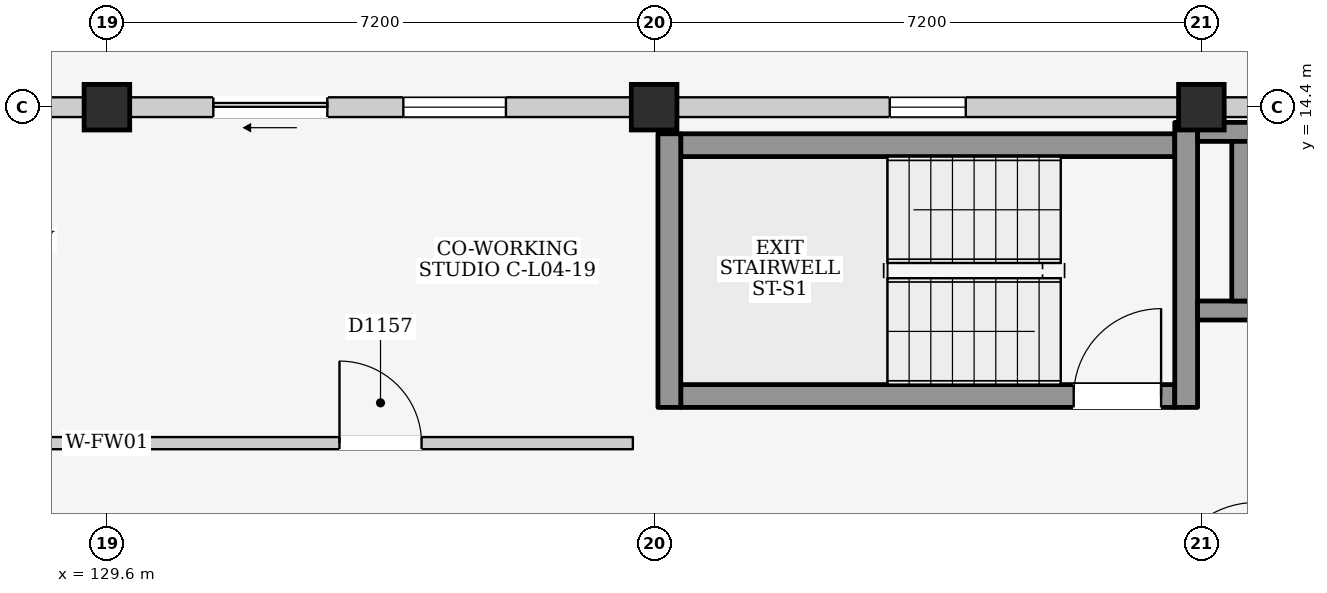
"""IFC4 building model, lengths in metres.
Left out: names, types, materials, properties, quantities, classifications, styles, units other than length and angle.
Written with IfcOpenShell. Run it as: python <this file> out.ifc"""

import sys

from ifc_helpers import new_model, si_unit, direction, frame, frame_2d, origin, origin_2d, place, context, subcontext, project, spatial, rectangle, extrude, element, fill, save


model = new_model("IFC4")
c1 = context("Model", 3, precision=1e-05, world=origin(), true_north=direction((0.0, 1.0)))
c2 = subcontext(c1, "Body", "Model", "MODEL_VIEW")
j1 = project(units=[si_unit("LENGTHUNIT", "METRE"), si_unit("PLANEANGLEUNIT", "RADIAN")], contexts=[c1])
p1 = place(None, origin())
s1 = spatial("IfcSite", under=j1, at=p1, CompositionType="ELEMENT")
p2 = place(p1, origin())
s2 = spatial("IfcBuilding", under=s1, at=p2, CompositionType="ELEMENT")
p3 = place(p2, frame((0.0, 0.0, 15.4)))
s3 = spatial("IfcBuildingStorey", under=s2, at=p3, CompositionType="ELEMENT", Elevation=15.4)
for number, where, z_axis, x_axis in (
    (1, (129.6, 14.4, 0.0), (0.0, 0.0, 1.0), (1.0, 0.0, 0.0)),
    (2, (136.8, 14.4, 0.0), (0.0, 0.0, 1.0), (1.0, 0.0, 0.0)),
    (3, (144.0, 14.4, 0.0), (0.0, 0.0, 1.0), (1.0, 0.0, 0.0)),
):
    element("IfcColumn", number, at=place(p3, frame(where, z_axis=z_axis, x_axis=x_axis)), inside=s3, PredefinedType="COLUMN", context=c2, shape_type="SweptSolid", body=[
        extrude(rectangle(XDim=0.6, YDim=0.6, at=origin_2d()), origin(), (0.0, 0.0, 1.0), 3.2),
    ])
p4 = place(p3, frame((122.7, 14.4, 0.0), z_axis=(0.0, 0.0, 1.0), x_axis=(1.0, 0.0, 0.0)))
e4 = element("IfcWall", 4, at=p4, inside=s3, PredefinedType="ELEMENTEDWALL", context=c2, shape_type="SweptSolid", body=[
    extrude(rectangle(XDim=6.6, YDim=0.26, at=frame_2d((3.3, 0.0))), origin(), (0.0, 0.0, 1.0), 2.335),
])
p5 = place(p4, frame((1.1, 0.0, 0.0)))
e5 = element("IfcOpeningElement", 5, at=p5, cuts=e4, PredefinedType="OPENING", context=c2, shape_type="SweptSolid", body=[
    extrude(rectangle(XDim=1.5, YDim=2.12, at=frame_2d((0.75, 1.06))), frame((0.0, 0.145, 0.0), z_axis=(0.0, -1.0, 0.0), x_axis=(1.0, 0.0, 0.0)), (0.0, 0.0, 1.0), 0.29),
])
p6 = place(p4, frame((3.6, 0.0, 0.725)))
e6 = element("IfcOpeningElement", 6, at=p6, cuts=e4, PredefinedType="OPENING", context=c2, shape_type="SweptSolid", body=[
    extrude(rectangle(XDim=1.35, YDim=1.5, at=frame_2d((0.675, 0.75))), frame((0.0, 0.145, 0.0), z_axis=(0.0, -1.0, 0.0), x_axis=(1.0, 0.0, 0.0)), (0.0, 0.0, 1.0), 0.29),
])
p7 = place(p3, frame((129.9, 14.4, 0.0), z_axis=(0.0, 0.0, 1.0), x_axis=(1.0, 0.0, 0.0)))
e7 = element("IfcWall", 7, at=p7, inside=s3, PredefinedType="ELEMENTEDWALL", context=c2, shape_type="SweptSolid", body=[
    extrude(rectangle(XDim=6.6, YDim=0.26, at=frame_2d((3.3, 0.0))), origin(), (0.0, 0.0, 1.0), 2.335),
])
p8 = place(p7, frame((1.1, 0.0, 0.0)))
e8 = element("IfcOpeningElement", 8, at=p8, cuts=e7, PredefinedType="OPENING", context=c2, shape_type="SweptSolid", body=[
    extrude(rectangle(XDim=1.5, YDim=2.12, at=frame_2d((0.75, 1.06))), frame((0.0, 0.145, 0.0), z_axis=(0.0, -1.0, 0.0), x_axis=(1.0, 0.0, 0.0)), (0.0, 0.0, 1.0), 0.29),
])
p9 = place(p7, frame((3.6, 0.0, 0.725)))
e9 = element("IfcOpeningElement", 9, at=p9, cuts=e7, PredefinedType="OPENING", context=c2, shape_type="SweptSolid", body=[
    extrude(rectangle(XDim=1.35, YDim=1.5, at=frame_2d((0.675, 0.75))), frame((0.0, 0.145, 0.0), z_axis=(0.0, -1.0, 0.0), x_axis=(1.0, 0.0, 0.0)), (0.0, 0.0, 1.0), 0.29),
])
p10 = place(p3, frame((137.1, 14.4, 0.0), z_axis=(0.0, 0.0, 1.0), x_axis=(1.0, 0.0, 0.0)))
e10 = element("IfcWall", 10, at=p10, inside=s3, PredefinedType="ELEMENTEDWALL", context=c2, shape_type="SweptSolid", body=[
    extrude(rectangle(XDim=6.6, YDim=0.26, at=frame_2d((3.3, 0.0))), origin(), (0.0, 0.0, 1.0), 2.335),
])
p11 = place(p10, frame((2.8, 0.0, 1.2)))
e11 = element("IfcOpeningElement", 11, at=p11, cuts=e10, PredefinedType="OPENING", context=c2, shape_type="SweptSolid", body=[
    extrude(rectangle(XDim=1.0, YDim=0.9, at=frame_2d((0.5, 0.45))), frame((0.0, 0.145, 0.0), z_axis=(0.0, -1.0, 0.0), x_axis=(1.0, 0.0, 0.0)), (0.0, 0.0, 1.0), 0.29),
])
p12 = place(p3, frame((144.3, 14.4, 0.0), z_axis=(0.0, 0.0, 1.0), x_axis=(1.0, 0.0, 0.0)))
e12 = element("IfcWall", 12, at=p12, inside=s3, PredefinedType="ELEMENTEDWALL", context=c2, shape_type="SweptSolid", body=[
    extrude(rectangle(XDim=6.6, YDim=0.26, at=frame_2d((3.3, 0.0))), origin(), (0.0, 0.0, 1.0), 2.335),
])
p13 = place(p12, frame((2.8, 0.0, 1.2)))
e13 = element("IfcOpeningElement", 13, at=p13, cuts=e12, PredefinedType="OPENING", context=c2, shape_type="SweptSolid", body=[
    extrude(rectangle(XDim=1.0, YDim=0.9, at=frame_2d((0.5, 0.45))), frame((0.0, 0.145, 0.0), z_axis=(0.0, -1.0, 0.0), x_axis=(1.0, 0.0, 0.0)), (0.0, 0.0, 1.0), 0.29),
])
p14 = place(p3, frame((137.15, 10.6, 0.0), z_axis=(0.0, 0.0, 1.0), x_axis=(1.0, 0.0, 0.0)))
e14 = element("IfcWall", 14, at=p14, inside=s3, PredefinedType="SHEAR", context=c2, shape_type="SweptSolid", body=[
    extrude(rectangle(XDim=6.5, YDim=0.3, at=frame_2d((3.25, 0.0))), origin(), (0.0, 0.0, 1.0), 2.95),
])
p15 = place(p14, frame((5.17, 0.0, 0.0)))
e15 = element("IfcOpeningElement", 15, at=p15, cuts=e14, PredefinedType="OPENING", context=c2, shape_type="SweptSolid", body=[
    extrude(rectangle(XDim=1.15, YDim=2.2, at=frame_2d((0.575, 1.1))), frame((0.0, 0.165, 0.0), z_axis=(0.0, -1.0, 0.0), x_axis=(1.0, 0.0, 0.0)), (0.0, 0.0, 1.0), 0.33),
])
p16 = place(p3, frame((137.15, 13.9, 0.0), z_axis=(0.0, 0.0, 1.0), x_axis=(1.0, 0.0, 0.0)))
e16 = element("IfcWall", 16, at=p16, inside=s3, PredefinedType="SHEAR", context=c2, shape_type="SweptSolid", body=[
    extrude(rectangle(XDim=6.5, YDim=0.3, at=frame_2d((3.25, 0.0))), origin(), (0.0, 0.0, 1.0), 2.95),
])
p17 = place(p3, frame((137.0, 10.45, 0.0), z_axis=(0.0, 0.0, 1.0), x_axis=(0.0, 1.0, 0.0)))
e17 = element("IfcWall", 17, at=p17, inside=s3, PredefinedType="SHEAR", context=c2, shape_type="SweptSolid", body=[
    extrude(rectangle(XDim=3.6, YDim=0.3, at=frame_2d((1.8, 0.0))), origin(), (0.0, 0.0, 1.0), 2.95),
])
p18 = place(p3, frame((143.8, 10.45, 0.0), z_axis=(0.0, 0.0, 1.0), x_axis=(0.0, 1.0, 0.0)))
e18 = element("IfcWall", 18, at=p18, inside=s3, PredefinedType="SHEAR", context=c2, shape_type="SweptSolid", body=[
    extrude(rectangle(XDim=3.75, YDim=0.3, at=frame_2d((1.875, 0.0))), origin(), (0.0, 0.0, 1.0), 2.95),
])
p19 = place(p3, frame((143.95, 11.725, 0.0), z_axis=(0.0, 0.0, 1.0), x_axis=(1.0, 0.0, 0.0)))
e19 = element("IfcWall", 19, at=p19, inside=s3, PredefinedType="SHEAR", context=c2, shape_type="SweptSolid", body=[
    extrude(rectangle(XDim=2.55, YDim=0.25, at=frame_2d((1.275, 0.0))), origin(), (0.0, 0.0, 1.0), 2.95),
])
p20 = place(p19, frame((0.95, 0.0, 0.0)))
e20 = element("IfcOpeningElement", 20, at=p20, cuts=e19, PredefinedType="OPENING", context=c2, shape_type="SweptSolid", body=[
    extrude(rectangle(XDim=1.1, YDim=2.15, at=frame_2d((0.55, 1.075))), frame((0.0, 0.14, 0.0), z_axis=(0.0, -1.0, 0.0), x_axis=(1.0, 0.0, 0.0)), (0.0, 0.0, 1.0), 0.28),
])
p21 = place(p3, frame((143.95, 14.075, 0.0), z_axis=(0.0, 0.0, 1.0), x_axis=(1.0, 0.0, 0.0)))
e21 = element("IfcWall", 21, at=p21, inside=s3, PredefinedType="SHEAR", context=c2, shape_type="SweptSolid", body=[
    extrude(rectangle(XDim=2.55, YDim=0.25, at=frame_2d((1.275, 0.0))), origin(), (0.0, 0.0, 1.0), 2.95),
])
p22 = place(p3, frame((144.525, 11.85, 0.0), z_axis=(0.0, 0.0, 1.0), x_axis=(0.0, 1.0, 0.0)))
e22 = element("IfcWall", 22, at=p22, inside=s3, PredefinedType="SHEAR", context=c2, shape_type="SweptSolid", body=[
    extrude(rectangle(XDim=2.1, YDim=0.25, at=frame_2d((1.05, 0.0))), origin(), (0.0, 0.0, 1.0), 2.95),
])
p23 = place(p3, frame((122.68, 9.98, 0.0), z_axis=(0.0, 0.0, 1.0), x_axis=(1.0, 0.0, 0.0)))
e23 = element("IfcWall", 23, at=p23, inside=s3, PredefinedType="PARTITIONING", context=c2, shape_type="SweptSolid", body=[
    extrude(rectangle(XDim=6.64, YDim=0.16, at=frame_2d((3.32, 0.0))), origin(), (0.0, 0.0, 1.0), 2.95),
])
p24 = place(p23, frame((2.78, 0.0, 0.0)))
e24 = element("IfcOpeningElement", 24, at=p24, cuts=e23, PredefinedType="OPENING", context=c2, shape_type="SweptSolid", body=[
    extrude(rectangle(XDim=1.08, YDim=2.22, at=frame_2d((0.54, 1.11))), frame((0.0, 0.095, 0.0), z_axis=(0.0, -1.0, 0.0), x_axis=(1.0, 0.0, 0.0)), (0.0, 0.0, 1.0), 0.19),
])
p25 = place(p3, frame((129.88, 9.98, 0.0), z_axis=(0.0, 0.0, 1.0), x_axis=(1.0, 0.0, 0.0)))
e25 = element("IfcWall", 25, at=p25, inside=s3, PredefinedType="PARTITIONING", context=c2, shape_type="SweptSolid", body=[
    extrude(rectangle(XDim=6.64, YDim=0.16, at=frame_2d((3.32, 0.0))), origin(), (0.0, 0.0, 1.0), 2.95),
])
p26 = place(p25, frame((2.78, 0.0, 0.0)))
e26 = element("IfcOpeningElement", 26, at=p26, cuts=e25, PredefinedType="OPENING", context=c2, shape_type="SweptSolid", body=[
    extrude(rectangle(XDim=1.08, YDim=2.22, at=frame_2d((0.54, 1.11))), frame((0.0, 0.095, 0.0), z_axis=(0.0, -1.0, 0.0), x_axis=(1.0, 0.0, 0.0)), (0.0, 0.0, 1.0), 0.19),
])
p27 = place(p8, frame((1.5, 0.0, 0.0), z_axis=(0.0, 0.0, 1.0), x_axis=(-1.0, 0.0, 0.0)))
e27 = element("IfcDoor", 27, at=p27, inside=s3, OperationType="SLIDING_TO_LEFT", PredefinedType="DOOR", context=c2, shape_type="SweptSolid", body=[
    extrude(rectangle(XDim=1.5, YDim=2.12, at=frame_2d((0.75, 1.06))), frame((0.0, 0.025, 0.0), z_axis=(0.0, -1.0, 0.0), x_axis=(1.0, 0.0, 0.0)), (0.0, 0.0, 1.0), 0.05),
])
fill(e8, e27)
p28 = place(p9, origin())
e28 = element("IfcWindow", 28, at=p28, inside=s3, PartitioningType="SINGLE_PANEL", PredefinedType="WINDOW", context=c2, shape_type="SweptSolid", body=[
    extrude(rectangle(XDim=1.35, YDim=1.5, at=frame_2d((0.675, 0.75))), frame((0.0, 0.03, 0.0), z_axis=(0.0, -1.0, 0.0), x_axis=(1.0, 0.0, 0.0)), (0.0, 0.0, 1.0), 0.06),
])
fill(e9, e28)
p29 = place(p11, origin())
e29 = element("IfcWindow", 29, at=p29, inside=s3, PartitioningType="SINGLE_PANEL", PredefinedType="WINDOW", context=c2, shape_type="SweptSolid", body=[
    extrude(rectangle(XDim=1.0, YDim=0.9, at=frame_2d((0.5, 0.45))), frame((0.0, 0.03, 0.0), z_axis=(0.0, -1.0, 0.0), x_axis=(1.0, 0.0, 0.0)), (0.0, 0.0, 1.0), 0.06),
])
fill(e11, e29)
p30 = place(p15, origin())
e30 = element("IfcDoor", 30, at=p30, inside=s3, OperationType="SINGLE_SWING_RIGHT", PredefinedType="DOOR", context=c2, shape_type="SweptSolid", body=[
    extrude(rectangle(XDim=1.15, YDim=2.2, at=frame_2d((0.575, 1.1))), frame((0.0, 0.025, 0.0), z_axis=(0.0, -1.0, 0.0), x_axis=(1.0, 0.0, 0.0)), (0.0, 0.0, 1.0), 0.05),
])
fill(e15, e30)
p31 = place(p26, origin())
e31 = element("IfcDoor", 31, at=p31, inside=s3, OperationType="SINGLE_SWING_LEFT", PredefinedType="DOOR", context=c2, shape_type="SweptSolid", body=[
    extrude(rectangle(XDim=1.08, YDim=2.22, at=frame_2d((0.54, 1.11))), frame((0.0, 0.025, 0.0), z_axis=(0.0, -1.0, 0.0), x_axis=(1.0, 0.0, 0.0)), (0.0, 0.0, 1.0), 0.05),
])
fill(e26, e31)
save(model, sys.argv[1])
